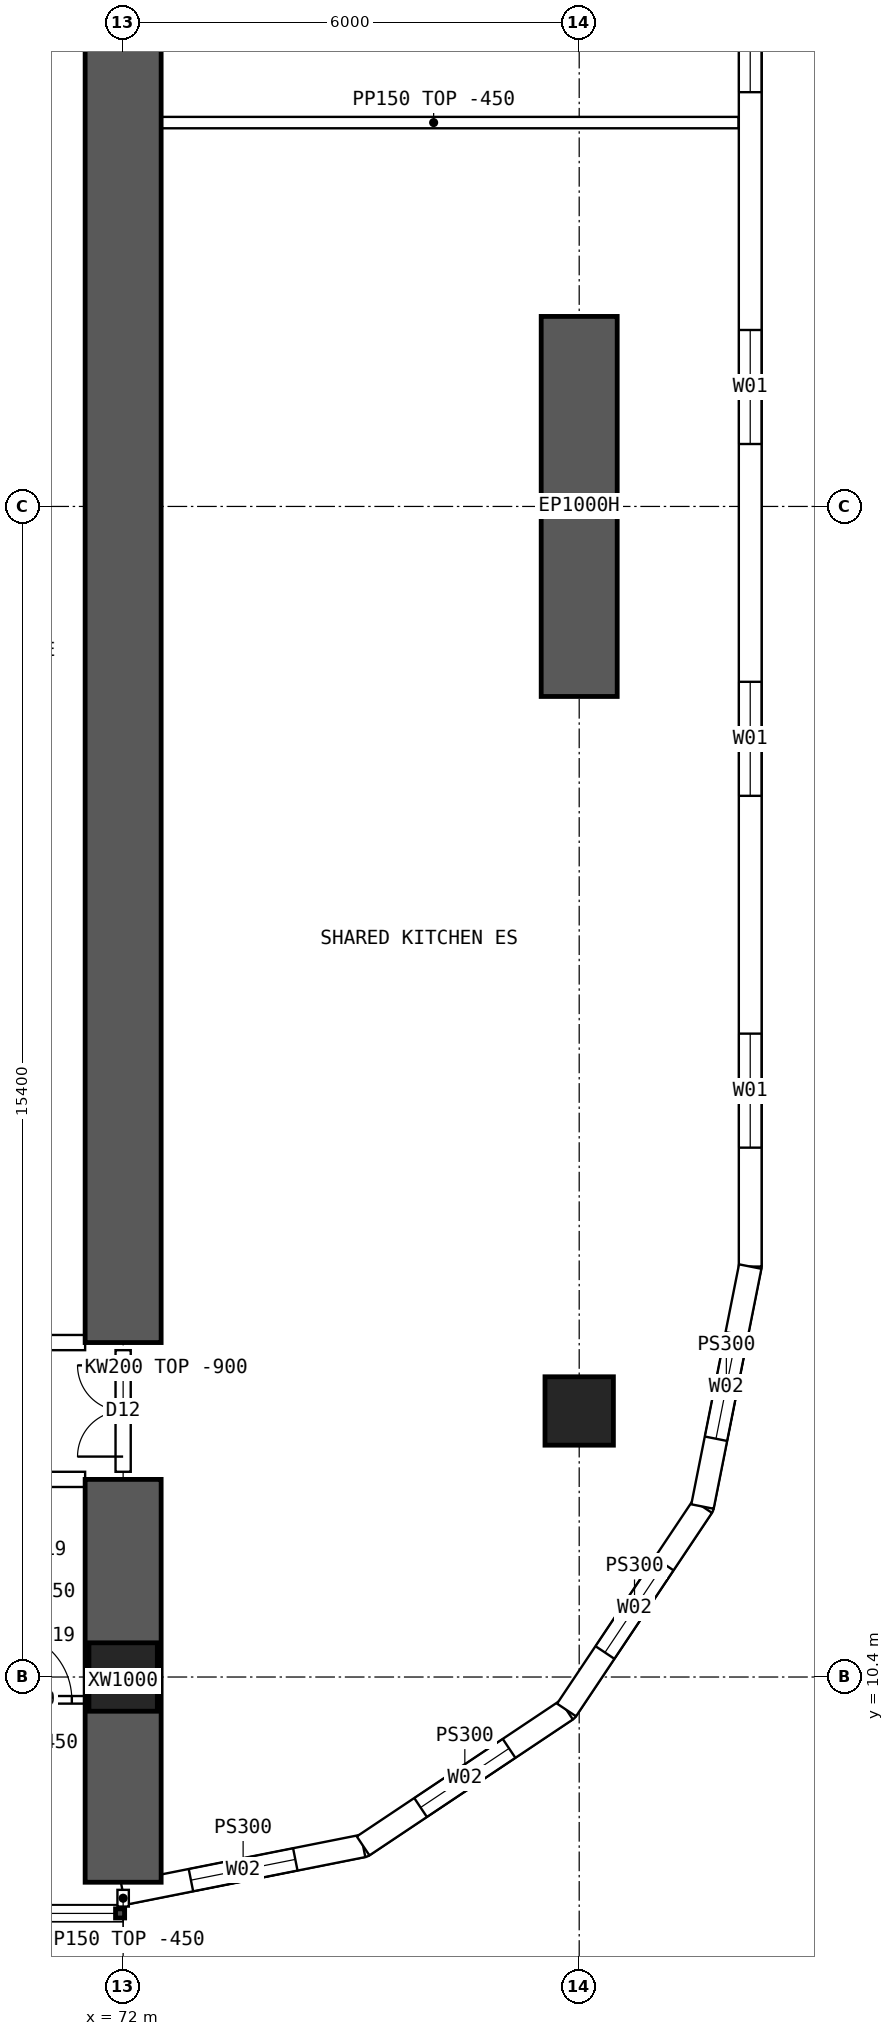
"""IFC4 building model, lengths in metres.
Left out: names, types, materials, properties, quantities, classifications, styles, units other than length and angle.
Written with IfcOpenShell. Run it as: python <this file> out.ifc"""

import sys

from ifc_helpers import new_model, si_unit, direction, frame, frame_2d, origin, origin_2d, place, context, subcontext, project, spatial, polyline, rectangle, hollow_rectangle, outline, extrude, element, fill, save


model = new_model("IFC4")
c1 = context("Model", 3, precision=1e-05, world=origin(), true_north=direction((0.0, 1.0)))
c2 = subcontext(c1, "Body", "Model", "MODEL_VIEW")
j1 = project(units=[si_unit("LENGTHUNIT", "METRE"), si_unit("PLANEANGLEUNIT", "RADIAN")], contexts=[c1])
p1 = place(None, origin())
s1 = spatial("IfcSite", under=j1, at=p1, CompositionType="ELEMENT")
p2 = place(p1, origin())
s2 = spatial("IfcBuilding", under=s1, at=p2, CompositionType="ELEMENT")
p3 = place(p2, frame((0.0, 0.0, 50.2)))
s3 = spatial("IfcBuildingStorey", under=s2, at=p3, CompositionType="ELEMENT", Elevation=50.2)
for number, where, z_axis, x_axis in (
    (1, (72.0, 10.4, 0.0), (0.0, 0.0, 1.0), (1.0, 0.0, 0.0)),
    (2, (78.0, 13.9, 0.0), (0.0, 0.0, 1.0), (1.0, 0.0, 0.0)),
):
    element("IfcColumn", number, at=place(p3, frame(where, z_axis=z_axis, x_axis=x_axis)), inside=s3, PredefinedType="COLUMN", context=c2, shape_type="SweptSolid", body=[
        extrude(hollow_rectangle(XDim=0.9, YDim=0.9, WallThickness=0.09, at=origin_2d()), origin(), (0.0, 0.0, 1.0), 3.75),
    ])
p4 = place(p3, frame((78.0, 23.3, 0.0), z_axis=(0.0, 0.0, 1.0), x_axis=(0.0, 1.0, 0.0)))
e3 = element("IfcWall", 3, at=p4, inside=s3, PredefinedType="SHEAR", context=c2, shape_type="SweptSolid", body=[
    extrude(rectangle(XDim=5.0, YDim=1.0, at=frame_2d((2.5, 0.0))), origin(), (0.0, 0.0, 1.0), 3.75),
])
p5 = place(p3, frame((72.0, 7.7, 0.0), z_axis=(0.0, 0.0, 1.0), x_axis=(0.0, 1.0, 0.0)))
e4 = element("IfcWall", 4, at=p5, inside=s3, PredefinedType="SHEAR", context=c2, shape_type="SweptSolid", body=[
    extrude(rectangle(XDim=5.3, YDim=1.0, at=frame_2d((2.65, 0.0))), origin(), (0.0, 0.0, 1.0), 3.75),
])
p6 = place(p3, frame((72.0, 14.8, 0.0), z_axis=(0.0, 0.0, 1.0), x_axis=(0.0, 1.0, 0.0)))
e5 = element("IfcWall", 5, at=p6, inside=s3, PredefinedType="SHEAR", context=c2, shape_type="SweptSolid", body=[
    extrude(rectangle(XDim=34.4, YDim=1.0, at=frame_2d((17.2, 0.0))), origin(), (0.0, 0.0, 1.0), 3.75),
])
p7 = place(p3, frame((80.25, 15.8, 0.0), z_axis=(0.0, 0.0, 1.0), x_axis=(0.0, 1.0, 0.0)))
e6 = element("IfcWall", 6, at=p7, inside=s3, PredefinedType="SOLIDWALL", context=c2, shape_type="SweptSolid", body=[
    extrude(outline(polyline([(-0.015, -0.15), (32.415, -0.15), (32.385, 0.15), (0.015, 0.15), (-0.015, -0.15)])), origin(), (0.0, 0.0, 1.0), 3.3),
])
p8 = place(p7, frame((1.564, 0.0, 0.9)))
e7 = element("IfcOpeningElement", 7, at=p8, cuts=e6, PredefinedType="OPENING", context=c2, shape_type="SweptSolid", body=[
    extrude(rectangle(XDim=1.5, YDim=2.0, at=frame_2d((0.75, 1.0))), frame((0.0, 0.16, 0.0), z_axis=(0.0, -1.0, 0.0), x_axis=(1.0, 0.0, 0.0)), (0.0, 0.0, 1.0), 0.32),
])
p9 = place(p7, frame((6.193, 0.0, 0.9)))
e8 = element("IfcOpeningElement", 8, at=p9, cuts=e6, PredefinedType="OPENING", context=c2, shape_type="SweptSolid", body=[
    extrude(rectangle(XDim=1.5, YDim=2.0, at=frame_2d((0.75, 1.0))), frame((0.0, 0.16, 0.0), z_axis=(0.0, -1.0, 0.0), x_axis=(1.0, 0.0, 0.0)), (0.0, 0.0, 1.0), 0.32),
])
p10 = place(p7, frame((10.822, 0.0, 0.9)))
e9 = element("IfcOpeningElement", 9, at=p10, cuts=e6, PredefinedType="OPENING", context=c2, shape_type="SweptSolid", body=[
    extrude(rectangle(XDim=1.5, YDim=2.0, at=frame_2d((0.75, 1.0))), frame((0.0, 0.16, 0.0), z_axis=(0.0, -1.0, 0.0), x_axis=(1.0, 0.0, 0.0)), (0.0, 0.0, 1.0), 0.32),
])
p11 = place(p7, frame((15.45, 0.0, 0.9)))
e10 = element("IfcOpeningElement", 10, at=p11, cuts=e6, PredefinedType="OPENING", context=c2, shape_type="SweptSolid", body=[
    extrude(rectangle(XDim=1.5, YDim=2.0, at=frame_2d((0.75, 1.0))), frame((0.0, 0.16, 0.0), z_axis=(0.0, -1.0, 0.0), x_axis=(1.0, 0.0, 0.0)), (0.0, 0.0, 1.0), 0.32),
])
p12 = place(p7, frame((20.079, 0.0, 0.9)))
e11 = element("IfcOpeningElement", 11, at=p12, cuts=e6, PredefinedType="OPENING", context=c2, shape_type="SweptSolid", body=[
    extrude(rectangle(XDim=1.5, YDim=2.0, at=frame_2d((0.75, 1.0))), frame((0.0, 0.16, 0.0), z_axis=(0.0, -1.0, 0.0), x_axis=(1.0, 0.0, 0.0)), (0.0, 0.0, 1.0), 0.32),
])
p13 = place(p7, frame((24.707, 0.0, 0.9)))
e12 = element("IfcOpeningElement", 12, at=p13, cuts=e6, PredefinedType="OPENING", context=c2, shape_type="SweptSolid", body=[
    extrude(rectangle(XDim=1.5, YDim=2.0, at=frame_2d((0.75, 1.0))), frame((0.0, 0.16, 0.0), z_axis=(0.0, -1.0, 0.0), x_axis=(1.0, 0.0, 0.0)), (0.0, 0.0, 1.0), 0.32),
])
p14 = place(p7, frame((29.336, 0.0, 0.9)))
e13 = element("IfcOpeningElement", 13, at=p14, cuts=e6, PredefinedType="OPENING", context=c2, shape_type="SweptSolid", body=[
    extrude(rectangle(XDim=1.5, YDim=2.0, at=frame_2d((0.75, 1.0))), frame((0.0, 0.16, 0.0), z_axis=(0.0, -1.0, 0.0), x_axis=(1.0, 0.0, 0.0)), (0.0, 0.0, 1.0), 0.32),
])
p15 = place(p3, frame((72.0, 7.55, 0.0), z_axis=(0.0, 0.0, 1.0), x_axis=(0.980787251524, 0.195080412259, 0.0)))
e14 = element("IfcWall", 14, at=p15, inside=s3, PredefinedType="SOLIDWALL", context=c2, shape_type="SweptSolid", body=[
    extrude(outline(polyline([(-0.03, -0.15), (3.249, -0.15), (3.189, 0.15), (0.03, 0.15), (-0.03, -0.15)])), origin(), (0.0, 0.0, 1.0), 3.3),
])
p16 = place(p15, frame((0.909, 0.0, 0.9)))
e15 = element("IfcOpeningElement", 15, at=p16, cuts=e14, PredefinedType="OPENING", context=c2, shape_type="SweptSolid", body=[
    extrude(rectangle(XDim=1.4, YDim=1.8, at=frame_2d((0.7, 0.9))), frame((0.0, 0.16, 0.0), z_axis=(0.0, -1.0, 0.0), x_axis=(1.0, 0.0, 0.0)), (0.0, 0.0, 1.0), 0.32),
])
p17 = place(p3, frame((75.157, 8.178, 0.0), z_axis=(0.0, 0.0, 1.0), x_axis=(0.831478105043, 0.555557522525, 0.0)))
e16 = element("IfcWall", 16, at=p17, inside=s3, PredefinedType="SOLIDWALL", context=c2, shape_type="SweptSolid", body=[
    extrude(outline(polyline([(-0.03, -0.15), (3.249, -0.15), (3.189, 0.15), (0.03, 0.15), (-0.03, -0.15)])), origin(), (0.0, 0.0, 1.0), 3.3),
])
p18 = place(p17, frame((0.909, 0.0, 0.9)))
e17 = element("IfcOpeningElement", 17, at=p18, cuts=e16, PredefinedType="OPENING", context=c2, shape_type="SweptSolid", body=[
    extrude(rectangle(XDim=1.4, YDim=1.8, at=frame_2d((0.7, 0.9))), frame((0.0, 0.16, 0.0), z_axis=(0.0, -1.0, 0.0), x_axis=(1.0, 0.0, 0.0)), (0.0, 0.0, 1.0), 0.32),
])
p19 = place(p3, frame((77.833, 9.966, 0.0), z_axis=(0.0, 0.0, 1.0), x_axis=(0.555609954424, 0.831443069936, 0.0)))
e18 = element("IfcWall", 18, at=p19, inside=s3, PredefinedType="SOLIDWALL", context=c2, shape_type="SweptSolid", body=[
    extrude(outline(polyline([(-0.03, -0.15), (3.249, -0.15), (3.189, 0.15), (0.03, 0.15), (-0.03, -0.15)])), origin(), (0.0, 0.0, 1.0), 3.3),
])
p20 = place(p19, frame((0.909, 0.0, 0.9)))
e19 = element("IfcOpeningElement", 19, at=p20, cuts=e18, PredefinedType="OPENING", context=c2, shape_type="SweptSolid", body=[
    extrude(rectangle(XDim=1.4, YDim=1.8, at=frame_2d((0.7, 0.9))), frame((0.0, 0.16, 0.0), z_axis=(0.0, -1.0, 0.0), x_axis=(1.0, 0.0, 0.0)), (0.0, 0.0, 1.0), 0.32),
])
p21 = place(p3, frame((79.622, 12.643, 0.0), z_axis=(0.0, 0.0, 1.0), x_axis=(0.195065901187, 0.980790137692, 0.0)))
e20 = element("IfcWall", 20, at=p21, inside=s3, PredefinedType="SOLIDWALL", context=c2, shape_type="SweptSolid", body=[
    extrude(outline(polyline([(-0.03, -0.15), (3.234, -0.15), (3.204, 0.15), (0.03, 0.15), (-0.03, -0.15)])), origin(), (0.0, 0.0, 1.0), 3.3),
])
p22 = place(p21, frame((0.909, 0.0, 0.9)))
e21 = element("IfcOpeningElement", 21, at=p22, cuts=e20, PredefinedType="OPENING", context=c2, shape_type="SweptSolid", body=[
    extrude(rectangle(XDim=1.4, YDim=1.8, at=frame_2d((0.7, 0.9))), frame((0.0, 0.16, 0.0), z_axis=(0.0, -1.0, 0.0), x_axis=(1.0, 0.0, 0.0)), (0.0, 0.0, 1.0), 0.32),
])
p23 = place(p3, frame((66.5, 13.0, 0.0), z_axis=(0.0, 0.0, 1.0), x_axis=(1.0, 0.0, 0.0)))
e22 = element("IfcWall", 22, at=p23, inside=s3, PredefinedType="SOLIDWALL", context=c2, shape_type="SweptSolid", body=[
    extrude(outline(polyline([(0.0, 0.0), (5.0, 0.0), (5.0, 2.9), (0.0, 2.9), (0.0, 0.0)])), frame((0.0, 0.1, 0.0), z_axis=(0.0, -1.0, 0.0), x_axis=(1.0, 0.0, 0.0)), (0.0, 0.0, 1.0), 0.2),
])
p24 = place(p23, frame((1.3, 0.0, 0.0)))
e23 = element("IfcOpeningElement", 23, at=p24, cuts=e22, PredefinedType="OPENING", context=c2, shape_type="SweptSolid", body=[
    extrude(rectangle(XDim=0.9, YDim=2.1, at=frame_2d((0.45, 1.05))), frame((0.0, 0.11, 0.0), z_axis=(0.0, -1.0, 0.0), x_axis=(1.0, 0.0, 0.0)), (0.0, 0.0, 1.0), 0.22),
])
p25 = place(p23, frame((2.675, 0.0, 0.0)))
e24 = element("IfcOpeningElement", 24, at=p25, cuts=e22, PredefinedType="OPENING", context=c2, shape_type="SweptSolid", body=[
    extrude(rectangle(XDim=0.9, YDim=2.1, at=frame_2d((0.45, 1.05))), frame((0.0, 0.11, 0.0), z_axis=(0.0, -1.0, 0.0), x_axis=(1.0, 0.0, 0.0)), (0.0, 0.0, 1.0), 0.22),
])
p26 = place(p3, frame((66.5, 14.8, 0.0), z_axis=(0.0, 0.0, 1.0), x_axis=(1.0, 0.0, 0.0)))
e25 = element("IfcWall", 25, at=p26, inside=s3, PredefinedType="SOLIDWALL", context=c2, shape_type="SweptSolid", body=[
    extrude(rectangle(XDim=5.0, YDim=0.2, at=frame_2d((2.5, 0.0))), origin(), (0.0, 0.0, 1.0), 3.3),
])
p27 = place(p26, frame((0.2, 0.0, 0.0)))
e26 = element("IfcOpeningElement", 26, at=p27, cuts=e25, PredefinedType="OPENING", context=c2, shape_type="SweptSolid", body=[
    extrude(rectangle(XDim=1.6, YDim=2.1, at=frame_2d((0.8, 1.05))), frame((0.0, 0.11, 0.0), z_axis=(0.0, -1.0, 0.0), x_axis=(1.0, 0.0, 0.0)), (0.0, 0.0, 1.0), 0.22),
])
p28 = place(p3, frame((71.55, 10.1, 0.0), z_axis=(0.0, 0.0, 1.0), x_axis=(-1.0, 0.0, 0.0)))
e27 = element("IfcWall", 27, at=p28, inside=s3, PredefinedType="PARTITIONING", context=c2, shape_type="SweptSolid", body=[
    extrude(rectangle(XDim=1.3, YDim=0.1, at=frame_2d((0.65, 0.0))), origin(), (0.0, 0.0, 1.0), 3.3),
])
p29 = place(p28, frame((0.225, 0.0, 0.0)))
e28 = element("IfcOpeningElement", 28, at=p29, cuts=e27, PredefinedType="OPENING", context=c2, shape_type="SweptSolid", body=[
    extrude(rectangle(XDim=0.9, YDim=2.1, at=frame_2d((0.45, 1.05))), frame((0.0, 0.06, 0.0), z_axis=(0.0, -1.0, 0.0), x_axis=(1.0, 0.0, 0.0)), (0.0, 0.0, 1.0), 0.12),
])
p30 = place(p3, frame((72.075, 30.85, 0.0), z_axis=(0.0, 0.0, 1.0), x_axis=(1.0, 0.0, 0.0)))
e29 = element("IfcWall", 29, at=p30, inside=s3, PredefinedType="PARTITIONING", context=c2, shape_type="SweptSolid", body=[
    extrude(outline(polyline([(0.0, 0.0), (8.02, 0.0), (8.02, 3.3), (6.227, 3.3), (6.225, 2.85), (5.627, 2.85), (5.625, 3.3), (0.0, 3.3), (0.0, 0.0)])), frame((0.0, 0.075, 0.0), z_axis=(0.0, -1.0, 0.0), x_axis=(1.0, 0.0, 0.0)), (0.0, 0.0, 1.0), 0.15),
])
p31 = place(p3, frame((72.0, 13.1, 0.0), z_axis=(0.0, 0.0, 1.0), x_axis=(0.0, 1.0, 0.0)))
e30 = element("IfcWall", 30, at=p31, inside=s3, PredefinedType="SOLIDWALL", context=c2, shape_type="SweptSolid", body=[
    extrude(outline(polyline([(0.0, 0.0), (1.6, 0.0), (1.6, 2.85), (0.0, 2.85), (0.0, 0.0)])), frame((0.0, 0.1, 0.0), z_axis=(0.0, -1.0, 0.0), x_axis=(1.0, 0.0, 0.0)), (0.0, 0.0, 1.0), 0.2),
])
p32 = place(p31, frame((0.2, 0.0, 0.0)))
e31 = element("IfcOpeningElement", 31, at=p32, cuts=e30, PredefinedType="OPENING", context=c2, shape_type="SweptSolid", body=[
    extrude(rectangle(XDim=1.2, YDim=2.1, at=frame_2d((0.6, 1.05))), frame((0.0, 0.11, 0.0), z_axis=(0.0, -1.0, 0.0), x_axis=(1.0, 0.0, 0.0)), (0.0, 0.0, 1.0), 0.22),
])
p33 = place(p3, frame((72.0, 7.6, 0.0), z_axis=(0.0, 0.0, 1.0), x_axis=(0.0, -1.0, 0.0)))
e32 = element("IfcWall", 32, at=p33, inside=s3, PredefinedType="PARTITIONING", context=c2, shape_type="SweptSolid", body=[
    extrude(rectangle(XDim=0.22, YDim=0.15, at=frame_2d((0.11, 0.0))), origin(), (0.0, 0.0, 1.0), 3.3),
])
p34 = place(p8, origin())
e33 = element("IfcWindow", 33, at=p34, inside=s3, PartitioningType="SINGLE_PANEL", PredefinedType="WINDOW", context=c2, shape_type="SweptSolid", body=[
    extrude(rectangle(XDim=1.5, YDim=2.0, at=frame_2d((0.75, 1.0))), frame((0.0, 0.03, 0.0), z_axis=(0.0, -1.0, 0.0), x_axis=(1.0, 0.0, 0.0)), (0.0, 0.0, 1.0), 0.06),
])
fill(e7, e33)
p35 = place(p9, origin())
e34 = element("IfcWindow", 34, at=p35, inside=s3, PartitioningType="SINGLE_PANEL", PredefinedType="WINDOW", context=c2, shape_type="SweptSolid", body=[
    extrude(rectangle(XDim=1.5, YDim=2.0, at=frame_2d((0.75, 1.0))), frame((0.0, 0.03, 0.0), z_axis=(0.0, -1.0, 0.0), x_axis=(1.0, 0.0, 0.0)), (0.0, 0.0, 1.0), 0.06),
])
fill(e8, e34)
p36 = place(p10, origin())
e35 = element("IfcWindow", 35, at=p36, inside=s3, PartitioningType="SINGLE_PANEL", PredefinedType="WINDOW", context=c2, shape_type="SweptSolid", body=[
    extrude(rectangle(XDim=1.5, YDim=2.0, at=frame_2d((0.75, 1.0))), frame((0.0, 0.03, 0.0), z_axis=(0.0, -1.0, 0.0), x_axis=(1.0, 0.0, 0.0)), (0.0, 0.0, 1.0), 0.06),
])
fill(e9, e35)
p37 = place(p11, origin())
e36 = element("IfcWindow", 36, at=p37, inside=s3, PartitioningType="SINGLE_PANEL", PredefinedType="WINDOW", context=c2, shape_type="SweptSolid", body=[
    extrude(rectangle(XDim=1.5, YDim=2.0, at=frame_2d((0.75, 1.0))), frame((0.0, 0.03, 0.0), z_axis=(0.0, -1.0, 0.0), x_axis=(1.0, 0.0, 0.0)), (0.0, 0.0, 1.0), 0.06),
])
fill(e10, e36)
p38 = place(p16, origin())
e37 = element("IfcWindow", 37, at=p38, inside=s3, PartitioningType="SINGLE_PANEL", PredefinedType="WINDOW", context=c2, shape_type="SweptSolid", body=[
    extrude(rectangle(XDim=1.4, YDim=1.8, at=frame_2d((0.7, 0.9))), frame((0.0, 0.03, 0.0), z_axis=(0.0, -1.0, 0.0), x_axis=(1.0, 0.0, 0.0)), (0.0, 0.0, 1.0), 0.06),
])
fill(e15, e37)
p39 = place(p18, origin())
e38 = element("IfcWindow", 38, at=p39, inside=s3, PartitioningType="SINGLE_PANEL", PredefinedType="WINDOW", context=c2, shape_type="SweptSolid", body=[
    extrude(rectangle(XDim=1.4, YDim=1.8, at=frame_2d((0.7, 0.9))), frame((0.0, 0.03, 0.0), z_axis=(0.0, -1.0, 0.0), x_axis=(1.0, 0.0, 0.0)), (0.0, 0.0, 1.0), 0.06),
])
fill(e17, e38)
p40 = place(p20, origin())
e39 = element("IfcWindow", 39, at=p40, inside=s3, PartitioningType="SINGLE_PANEL", PredefinedType="WINDOW", context=c2, shape_type="SweptSolid", body=[
    extrude(rectangle(XDim=1.4, YDim=1.8, at=frame_2d((0.7, 0.9))), frame((0.0, 0.03, 0.0), z_axis=(0.0, -1.0, 0.0), x_axis=(1.0, 0.0, 0.0)), (0.0, 0.0, 1.0), 0.06),
])
fill(e19, e39)
p41 = place(p22, origin())
e40 = element("IfcWindow", 40, at=p41, inside=s3, PartitioningType="SINGLE_PANEL", PredefinedType="WINDOW", context=c2, shape_type="SweptSolid", body=[
    extrude(rectangle(XDim=1.4, YDim=1.8, at=frame_2d((0.7, 0.9))), frame((0.0, 0.03, 0.0), z_axis=(0.0, -1.0, 0.0), x_axis=(1.0, 0.0, 0.0)), (0.0, 0.0, 1.0), 0.06),
])
fill(e21, e40)
p42 = place(p29, origin())
e41 = element("IfcDoor", 41, at=p42, inside=s3, OperationType="SINGLE_SWING_RIGHT", PredefinedType="DOOR", context=c2, shape_type="SweptSolid", body=[
    extrude(rectangle(XDim=0.9, YDim=2.1, at=frame_2d((0.45, 1.05))), frame((0.0, 0.025, 0.0), z_axis=(0.0, -1.0, 0.0), x_axis=(1.0, 0.0, 0.0)), (0.0, 0.0, 1.0), 0.05),
])
fill(e28, e41)
p43 = place(p32, origin())
e42 = element("IfcDoor", 42, at=p43, inside=s3, OperationType="DOUBLE_DOOR_SINGLE_SWING", PredefinedType="DOOR", context=c2, shape_type="SweptSolid", body=[
    extrude(rectangle(XDim=1.2, YDim=2.1, at=frame_2d((0.6, 1.05))), frame((0.0, 0.025, 0.0), z_axis=(0.0, -1.0, 0.0), x_axis=(1.0, 0.0, 0.0)), (0.0, 0.0, 1.0), 0.05),
])
fill(e31, e42)
save(model, sys.argv[1])
